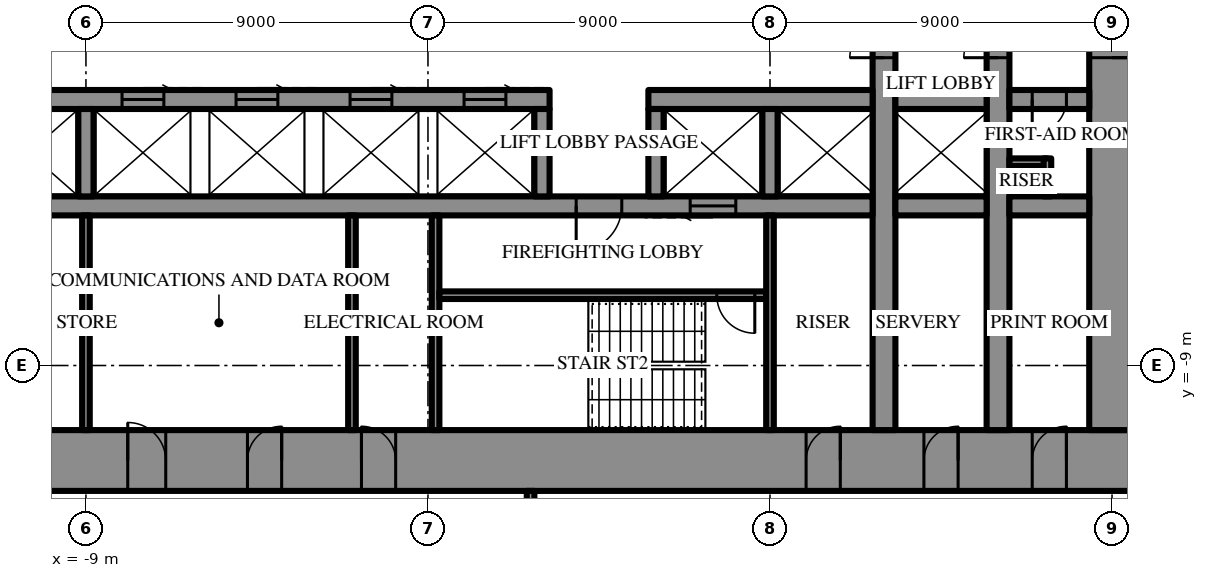
"""IFC4 building model, lengths in metres.
Left out: names, types, materials, properties, quantities, classifications, styles, units other than length and angle.
Written with IfcOpenShell. Run it as: python <this file> out.ifc"""

import sys

from ifc_helpers import new_model, si_unit, direction, frame, frame_2d, origin, place, context, subcontext, project, spatial, rectangle, extrude, element, fill, save


model = new_model("IFC4")
c1 = context("Model", 3, precision=1e-05, world=origin(), true_north=direction((0.0, 1.0)))
c2 = subcontext(c1, "Body", "Model", "MODEL_VIEW")
j1 = project(units=[si_unit("LENGTHUNIT", "METRE"), si_unit("PLANEANGLEUNIT", "RADIAN")], contexts=[c1])
p1 = place(None, origin())
s1 = spatial("IfcSite", under=j1, at=p1, CompositionType="ELEMENT")
p2 = place(p1, origin())
s2 = spatial("IfcBuilding", under=s1, at=p2, CompositionType="ELEMENT")
p3 = place(p2, frame((0.0, 0.0, 148.9)))
s3 = spatial("IfcBuildingStorey", under=s2, at=p3, CompositionType="ELEMENT", Elevation=148.9)
p4 = place(p3, frame((18.6, -11.5, 0.0), z_axis=(0.0, 0.0, 1.0), x_axis=(-1.0, 0.0, 0.0)))
e1 = element("IfcWall", 1, at=p4, inside=s3, PredefinedType="SHEAR", context=c2, shape_type="SweptSolid", body=[
    extrude(rectangle(XDim=37.2, YDim=1.6, at=frame_2d((18.6, 0.0))), origin(), (0.0, 0.0, 1.0), 4.2),
])
p5 = place(p4, frame((19.45, 0.0, 0.0)))
e2 = element("IfcOpeningElement", 2, at=p5, cuts=e1, PredefinedType="OPENING", context=c2, shape_type="SweptSolid", body=[
    extrude(rectangle(XDim=0.9, YDim=2.2, at=frame_2d((0.45, 1.1))), frame((0.0, 0.81, 0.0), z_axis=(0.0, -1.0, 0.0), x_axis=(1.0, 0.0, 0.0)), (0.0, 0.0, 1.0), 1.62),
])
p6 = place(p4, frame((22.45, 0.0, 0.0)))
e3 = element("IfcOpeningElement", 3, at=p6, cuts=e1, PredefinedType="OPENING", context=c2, shape_type="SweptSolid", body=[
    extrude(rectangle(XDim=0.9, YDim=2.2, at=frame_2d((0.45, 1.1))), frame((0.0, 0.81, 0.0), z_axis=(0.0, -1.0, 0.0), x_axis=(1.0, 0.0, 0.0)), (0.0, 0.0, 1.0), 1.62),
])
p7 = place(p4, frame((25.5, 0.0, 0.0)))
e4 = element("IfcOpeningElement", 4, at=p7, cuts=e1, PredefinedType="OPENING", context=c2, shape_type="SweptSolid", body=[
    extrude(rectangle(XDim=1.0, YDim=2.2, at=frame_2d((0.5, 1.1))), frame((0.0, 0.81, 0.0), z_axis=(0.0, -1.0, 0.0), x_axis=(1.0, 0.0, 0.0)), (0.0, 0.0, 1.0), 1.62),
])
p8 = place(p4, frame((1.8, 0.0, 0.0)))
e5 = element("IfcOpeningElement", 5, at=p8, cuts=e1, PredefinedType="OPENING", context=c2, shape_type="SweptSolid", body=[
    extrude(rectangle(XDim=0.9, YDim=2.2, at=frame_2d((0.45, 1.1))), frame((0.0, 0.81, 0.0), z_axis=(0.0, -1.0, 0.0), x_axis=(1.0, 0.0, 0.0)), (0.0, 0.0, 1.0), 1.62),
])
p9 = place(p4, frame((4.65, 0.0, 0.0)))
e6 = element("IfcOpeningElement", 6, at=p9, cuts=e1, PredefinedType="OPENING", context=c2, shape_type="SweptSolid", body=[
    extrude(rectangle(XDim=0.9, YDim=2.2, at=frame_2d((0.45, 1.1))), frame((0.0, 0.81, 0.0), z_axis=(0.0, -1.0, 0.0), x_axis=(1.0, 0.0, 0.0)), (0.0, 0.0, 1.0), 1.62),
])
p10 = place(p4, frame((7.75, 0.0, 0.0)))
e7 = element("IfcOpeningElement", 7, at=p10, cuts=e1, PredefinedType="OPENING", context=c2, shape_type="SweptSolid", body=[
    extrude(rectangle(XDim=0.9, YDim=2.2, at=frame_2d((0.45, 1.1))), frame((0.0, 0.81, 0.0), z_axis=(0.0, -1.0, 0.0), x_axis=(1.0, 0.0, 0.0)), (0.0, 0.0, 1.0), 1.62),
])
p11 = place(p4, frame((28.55, 0.0, 0.0)))
e8 = element("IfcOpeningElement", 8, at=p11, cuts=e1, PredefinedType="OPENING", context=c2, shape_type="SweptSolid", body=[
    extrude(rectangle(XDim=0.9, YDim=2.2, at=frame_2d((0.45, 1.1))), frame((0.0, 0.81, 0.0), z_axis=(0.0, -1.0, 0.0), x_axis=(1.0, 0.0, 0.0)), (0.0, 0.0, 1.0), 1.62),
])
p12 = place(p4, frame((31.65, 0.0, 0.0)))
e9 = element("IfcOpeningElement", 9, at=p12, cuts=e1, PredefinedType="OPENING", context=c2, shape_type="SweptSolid", body=[
    extrude(rectangle(XDim=0.9, YDim=2.2, at=frame_2d((0.45, 1.1))), frame((0.0, 0.81, 0.0), z_axis=(0.0, -1.0, 0.0), x_axis=(1.0, 0.0, 0.0)), (0.0, 0.0, 1.0), 1.62),
])
p13 = place(p4, frame((34.5, 0.0, 0.0)))
e10 = element("IfcOpeningElement", 10, at=p13, cuts=e1, PredefinedType="OPENING", context=c2, shape_type="SweptSolid", body=[
    extrude(rectangle(XDim=0.9, YDim=2.2, at=frame_2d((0.45, 1.1))), frame((0.0, 0.81, 0.0), z_axis=(0.0, -1.0, 0.0), x_axis=(1.0, 0.0, 0.0)), (0.0, 0.0, 1.0), 1.62),
])
p14 = place(p3, frame((18.0, -10.7, 0.0), z_axis=(0.0, 0.0, 1.0), x_axis=(0.0, 1.0, 0.0)))
e11 = element("IfcWall", 11, at=p14, inside=s3, PredefinedType="SHEAR", context=c2, shape_type="SweptSolid", body=[
    extrude(rectangle(XDim=21.4, YDim=1.2, at=frame_2d((10.7, 0.0))), origin(), (0.0, 0.0, 1.0), 4.2),
])
p15 = place(p14, frame((9.8, 0.0, 0.0)))
e12 = element("IfcOpeningElement", 12, at=p15, cuts=e11, PredefinedType="OPENING", context=c2, shape_type="SweptSolid", body=[
    extrude(rectangle(XDim=1.8, YDim=2.4, at=frame_2d((0.9, 1.2))), frame((0.0, 0.61, 0.0), z_axis=(0.0, -1.0, 0.0), x_axis=(1.0, 0.0, 0.0)), (0.0, 0.0, 1.0), 1.22),
])
p16 = place(p3, frame((12.0, -10.7, 0.0), z_axis=(0.0, 0.0, 1.0), x_axis=(0.0, 1.0, 0.0)))
e13 = element("IfcWall", 13, at=p16, inside=s3, PredefinedType="SHEAR", context=c2, shape_type="SweptSolid", body=[
    extrude(rectangle(XDim=21.4, YDim=0.6, at=frame_2d((10.7, 0.0))), origin(), (0.0, 0.0, 1.0), 4.2),
])
p17 = place(p16, frame((9.8, 0.0, 0.0)))
e14 = element("IfcOpeningElement", 14, at=p17, cuts=e13, PredefinedType="OPENING", context=c2, shape_type="SweptSolid", body=[
    extrude(rectangle(XDim=1.8, YDim=2.4, at=frame_2d((0.9, 1.2))), frame((0.0, 0.31, 0.0), z_axis=(0.0, -1.0, 0.0), x_axis=(1.0, 0.0, 0.0)), (0.0, 0.0, 1.0), 0.62),
])
p18 = place(p3, frame((15.0, -10.7, 0.0), z_axis=(0.0, 0.0, 1.0), x_axis=(0.0, 1.0, 0.0)))
e15 = element("IfcWall", 15, at=p18, inside=s3, PredefinedType="SHEAR", context=c2, shape_type="SweptSolid", body=[
    extrude(rectangle(XDim=21.4, YDim=0.6, at=frame_2d((10.7, 0.0))), origin(), (0.0, 0.0, 1.0), 4.2),
])
p19 = place(p18, frame((9.8, 0.0, 0.0)))
e16 = element("IfcOpeningElement", 16, at=p19, cuts=e15, PredefinedType="OPENING", context=c2, shape_type="SweptSolid", body=[
    extrude(rectangle(XDim=1.8, YDim=2.4, at=frame_2d((0.9, 1.2))), frame((0.0, 0.31, 0.0), z_axis=(0.0, -1.0, 0.0), x_axis=(1.0, 0.0, 0.0)), (0.0, 0.0, 1.0), 0.62),
])
p20 = place(p3, frame((17.4, -2.0, 0.0), z_axis=(0.0, 0.0, 1.0), x_axis=(-1.0, 0.0, 0.0)))
e17 = element("IfcWall", 17, at=p20, inside=s3, PredefinedType="SHEAR", context=c2, shape_type="SweptSolid", body=[
    extrude(rectangle(XDim=2.1, YDim=0.5, at=frame_2d((1.05, 0.0))), origin(), (0.0, 0.0, 1.0), 4.2),
])
p21 = place(p20, frame((0.6, 0.0, 0.0)))
e18 = element("IfcOpeningElement", 18, at=p21, cuts=e17, PredefinedType="OPENING", context=c2, shape_type="SweptSolid", body=[
    extrude(rectangle(XDim=0.9, YDim=2.2, at=frame_2d((0.45, 1.1))), frame((0.0, 0.26, 0.0), z_axis=(0.0, -1.0, 0.0), x_axis=(1.0, 0.0, 0.0)), (0.0, 0.0, 1.0), 0.52),
])
p22 = place(p3, frame((14.7, -2.0, 0.0), z_axis=(0.0, 0.0, 1.0), x_axis=(-1.0, 0.0, 0.0)))
e19 = element("IfcWall", 19, at=p22, inside=s3, PredefinedType="SHEAR", context=c2, shape_type="SweptSolid", body=[
    extrude(rectangle(XDim=2.4, YDim=0.5, at=frame_2d((1.2, 0.0))), origin(), (0.0, 0.0, 1.0), 4.2),
])
p23 = place(p3, frame((11.7, -2.0, 0.0), z_axis=(0.0, 0.0, 1.0), x_axis=(-1.0, 0.0, 0.0)))
e20 = element("IfcWall", 20, at=p23, inside=s3, PredefinedType="SHEAR", context=c2, shape_type="SweptSolid", body=[
    extrude(rectangle(XDim=5.9, YDim=0.5, at=frame_2d((2.95, 0.0))), origin(), (0.0, 0.0, 1.0), 4.2),
])
p24 = place(p3, frame((3.2, -2.0, 0.0), z_axis=(0.0, 0.0, 1.0), x_axis=(-1.0, 0.0, 0.0)))
e21 = element("IfcWall", 21, at=p24, inside=s3, PredefinedType="SHEAR", context=c2, shape_type="SweptSolid", body=[
    extrude(rectangle(XDim=14.9, YDim=0.5, at=frame_2d((7.45, 0.0))), origin(), (0.0, 0.0, 1.0), 4.2),
])
p25 = place(p24, frame((1.15, 0.0, 0.0)))
e22 = element("IfcOpeningElement", 22, at=p25, cuts=e21, PredefinedType="OPENING", context=c2, shape_type="SweptSolid", body=[
    extrude(rectangle(XDim=1.1, YDim=2.2, at=frame_2d((0.55, 1.1))), frame((0.0, 0.26, 0.0), z_axis=(0.0, -1.0, 0.0), x_axis=(1.0, 0.0, 0.0)), (0.0, 0.0, 1.0), 0.52),
])
p26 = place(p24, frame((4.15, 0.0, 0.0)))
e23 = element("IfcOpeningElement", 23, at=p26, cuts=e21, PredefinedType="OPENING", context=c2, shape_type="SweptSolid", body=[
    extrude(rectangle(XDim=1.1, YDim=2.2, at=frame_2d((0.55, 1.1))), frame((0.0, 0.26, 0.0), z_axis=(0.0, -1.0, 0.0), x_axis=(1.0, 0.0, 0.0)), (0.0, 0.0, 1.0), 0.52),
])
p27 = place(p24, frame((7.15, 0.0, 0.0)))
e24 = element("IfcOpeningElement", 24, at=p27, cuts=e21, PredefinedType="OPENING", context=c2, shape_type="SweptSolid", body=[
    extrude(rectangle(XDim=1.1, YDim=2.2, at=frame_2d((0.55, 1.1))), frame((0.0, 0.26, 0.0), z_axis=(0.0, -1.0, 0.0), x_axis=(1.0, 0.0, 0.0)), (0.0, 0.0, 1.0), 0.52),
])
p28 = place(p24, frame((10.15, 0.0, 0.0)))
e25 = element("IfcOpeningElement", 25, at=p28, cuts=e21, PredefinedType="OPENING", context=c2, shape_type="SweptSolid", body=[
    extrude(rectangle(XDim=1.1, YDim=2.2, at=frame_2d((0.55, 1.1))), frame((0.0, 0.26, 0.0), z_axis=(0.0, -1.0, 0.0), x_axis=(1.0, 0.0, 0.0)), (0.0, 0.0, 1.0), 0.52),
])
p29 = place(p3, frame((17.4, -4.8, 0.0), z_axis=(0.0, 0.0, 1.0), x_axis=(-1.0, 0.0, 0.0)))
e26 = element("IfcWall", 26, at=p29, inside=s3, PredefinedType="SHEAR", context=c2, shape_type="SweptSolid", body=[
    extrude(rectangle(XDim=2.1, YDim=0.5, at=frame_2d((1.05, 0.0))), origin(), (0.0, 0.0, 1.0), 4.2),
])
p30 = place(p3, frame((14.7, -4.8, 0.0), z_axis=(0.0, 0.0, 1.0), x_axis=(-1.0, 0.0, 0.0)))
e27 = element("IfcWall", 27, at=p30, inside=s3, PredefinedType="SHEAR", context=c2, shape_type="SweptSolid", body=[
    extrude(rectangle(XDim=2.4, YDim=0.5, at=frame_2d((1.2, 0.0))), origin(), (0.0, 0.0, 1.0), 4.2),
])
p31 = place(p3, frame((11.7, -4.8, 0.0), z_axis=(0.0, 0.0, 1.0), x_axis=(-1.0, 0.0, 0.0)))
e28 = element("IfcWall", 28, at=p31, inside=s3, PredefinedType="SHEAR", context=c2, shape_type="SweptSolid", body=[
    extrude(rectangle(XDim=23.4, YDim=0.5, at=frame_2d((11.7, 0.0))), origin(), (0.0, 0.0, 1.0), 4.2),
])
p32 = place(p31, frame((6.6, 0.0, 0.0)))
e29 = element("IfcOpeningElement", 29, at=p32, cuts=e28, PredefinedType="OPENING", context=c2, shape_type="SweptSolid", body=[
    extrude(rectangle(XDim=1.2, YDim=2.2, at=frame_2d((0.6, 1.1))), frame((0.0, 0.26, 0.0), z_axis=(0.0, -1.0, 0.0), x_axis=(1.0, 0.0, 0.0)), (0.0, 0.0, 1.0), 0.52),
])
p33 = place(p31, frame((3.6, 0.0, 0.0)))
e30 = element("IfcOpeningElement", 30, at=p33, cuts=e28, PredefinedType="OPENING", context=c2, shape_type="SweptSolid", body=[
    extrude(rectangle(XDim=1.2, YDim=2.2, at=frame_2d((0.6, 1.1))), frame((0.0, 0.26, 0.0), z_axis=(0.0, -1.0, 0.0), x_axis=(1.0, 0.0, 0.0)), (0.0, 0.0, 1.0), 0.52),
])
for number, where, z_axis, x_axis in (
    (31, (9.0, -2.25, 0.0), (0.0, 0.0, 1.0), (0.0, -1.0, 0.0)),
    (32, (6.0, -2.25, 0.0), (0.0, 0.0, 1.0), (0.0, -1.0, 0.0)),
    (33, (3.0, -2.25, 0.0), (0.0, 0.0, 1.0), (0.0, -1.0, 0.0)),
    (34, (-9.0, -2.25, 0.0), (0.0, 0.0, 1.0), (0.0, -1.0, 0.0)),
):
    element("IfcWall", number, at=place(p3, frame(where, z_axis=z_axis, x_axis=x_axis)), inside=s3, PredefinedType="SHEAR", context=c2, shape_type="SweptSolid", body=[
        extrude(rectangle(XDim=2.3, YDim=0.4, at=frame_2d((1.15, 0.0))), origin(), (0.0, 0.0, 1.0), 4.2),
    ])
p34 = place(p3, frame((0.2, -5.05, 0.0), z_axis=(0.0, 0.0, 1.0), x_axis=(0.0, -1.0, 0.0)))
e35 = element("IfcWall", 35, at=p34, inside=s3, PredefinedType="SHEAR", context=c2, shape_type="SweptSolid", body=[
    extrude(rectangle(XDim=5.65, YDim=0.2, at=frame_2d((2.825, 0.0))), origin(), (0.0, 0.0, 1.0), 4.2),
])
p35 = place(p3, frame((8.9, -7.15, 0.0), z_axis=(0.0, 0.0, 1.0), x_axis=(-1.0, 0.0, 0.0)))
e36 = element("IfcWall", 36, at=p35, inside=s3, PredefinedType="SHEAR", context=c2, shape_type="SweptSolid", body=[
    extrude(rectangle(XDim=8.6, YDim=0.2, at=frame_2d((4.3, 0.0))), origin(), (0.0, 0.0, 1.0), 4.2),
])
p36 = place(p35, frame((0.3, 0.0, 0.0)))
e37 = element("IfcOpeningElement", 37, at=p36, cuts=e36, PredefinedType="OPENING", context=c2, shape_type="SweptSolid", body=[
    extrude(rectangle(XDim=1.0, YDim=2.2, at=frame_2d((0.5, 1.1))), frame((0.0, 0.11, 0.0), z_axis=(0.0, -1.0, 0.0), x_axis=(1.0, 0.0, 0.0)), (0.0, 0.0, 1.0), 0.22),
])
for number, where, z_axis, x_axis in (
    (38, (9.0, -5.05, 0.0), (0.0, 0.0, 1.0), (0.0, -1.0, 0.0)),
    (39, (-9.0, -5.05, 0.0), (0.0, 0.0, 1.0), (0.0, -1.0, 0.0)),
    (40, (-2.0, -5.05, 0.0), (0.0, 0.0, 1.0), (0.0, -1.0, 0.0)),
):
    element("IfcWall", number, at=place(p3, frame(where, z_axis=z_axis, x_axis=x_axis)), inside=s3, PredefinedType="PARTITIONING", context=c2, shape_type="SweptSolid", body=[
        extrude(rectangle(XDim=5.65, YDim=0.2, at=frame_2d((2.825, 0.0))), origin(), (0.0, 0.0, 1.0), 4.0),
    ])
for number, where, z_axis, x_axis in (
    (41, (16.3, -3.65, 0.0), (0.0, 0.0, 1.0), (-1.0, 0.0, 0.0)),
    (42, (16.3, -3.55, 0.0), (0.0, 0.0, 1.0), (0.0, -1.0, 0.0)),
):
    element("IfcWall", number, at=place(p3, frame(where, z_axis=z_axis, x_axis=x_axis)), inside=s3, PredefinedType="PARTITIONING", context=c2, shape_type="SweptSolid", body=[
        extrude(rectangle(XDim=1.0, YDim=0.2, at=frame_2d((0.5, 0.0))), origin(), (0.0, 0.0, 1.0), 4.0),
    ])
p37 = place(p3, frame((2.7, -12.3, 0.0), z_axis=(0.0, 0.0, 1.0), x_axis=(0.0, -1.0, 0.0)))
e43 = element("IfcWall", 43, at=p37, inside=s3, PredefinedType="PARTITIONING", context=c2, shape_type="SweptSolid", body=[
    extrude(rectangle(XDim=1.7, YDim=0.2, at=frame_2d((0.85, 0.0))), origin(), (0.0, 0.0, 1.0), 4.0),
])
p38 = place(p37, frame((0.35, 0.0, 0.0)))
e44 = element("IfcOpeningElement", 44, at=p38, cuts=e43, PredefinedType="OPENING", context=c2, shape_type="SweptSolid", body=[
    extrude(rectangle(XDim=1.0, YDim=2.2, at=frame_2d((0.5, 1.1))), frame((0.0, 0.11, 0.0), z_axis=(0.0, -1.0, 0.0), x_axis=(1.0, 0.0, 0.0)), (0.0, 0.0, 1.0), 0.22),
])
p39 = place(p15, frame((1.8, 0.0, 0.0), z_axis=(0.0, 0.0, 1.0), x_axis=(-1.0, 0.0, 0.0)))
e45 = element("IfcDoor", 45, at=p39, inside=s3, OperationType="DOUBLE_DOOR_SINGLE_SWING", PredefinedType="DOOR", context=c2, shape_type="SweptSolid", body=[
    extrude(rectangle(XDim=1.8, YDim=2.4, at=frame_2d((0.9, 1.2))), frame((0.0, 0.025, 0.0), z_axis=(0.0, -1.0, 0.0), x_axis=(1.0, 0.0, 0.0)), (0.0, 0.0, 1.0), 0.05),
])
fill(e12, e45)
p40 = place(p32, origin())
e46 = element("IfcDoor", 46, at=p40, inside=s3, OperationType="SINGLE_SWING_LEFT", PredefinedType="DOOR", context=c2, shape_type="SweptSolid", body=[
    extrude(rectangle(XDim=1.2, YDim=2.2, at=frame_2d((0.6, 1.1))), frame((0.0, 0.025, 0.0), z_axis=(0.0, -1.0, 0.0), x_axis=(1.0, 0.0, 0.0)), (0.0, 0.0, 1.0), 0.05),
])
fill(e29, e46)
p41 = place(p36, origin())
e47 = element("IfcDoor", 47, at=p41, inside=s3, OperationType="SINGLE_SWING_RIGHT", PredefinedType="DOOR", context=c2, shape_type="SweptSolid", body=[
    extrude(rectangle(XDim=1.0, YDim=2.2, at=frame_2d((0.5, 1.1))), frame((0.0, 0.025, 0.0), z_axis=(0.0, -1.0, 0.0), x_axis=(1.0, 0.0, 0.0)), (0.0, 0.0, 1.0), 0.05),
])
fill(e37, e47)
p42 = place(p5, frame((0.9, 0.0, 0.0), z_axis=(0.0, 0.0, 1.0), x_axis=(-1.0, 0.0, 0.0)))
e48 = element("IfcDoor", 48, at=p42, inside=s3, OperationType="SINGLE_SWING_RIGHT", PredefinedType="DOOR", context=c2, shape_type="SweptSolid", body=[
    extrude(rectangle(XDim=0.9, YDim=2.2, at=frame_2d((0.45, 1.1))), frame((0.0, 0.025, 0.0), z_axis=(0.0, -1.0, 0.0), x_axis=(1.0, 0.0, 0.0)), (0.0, 0.0, 1.0), 0.05),
])
fill(e2, e48)
p43 = place(p6, frame((0.9, 0.0, 0.0), z_axis=(0.0, 0.0, 1.0), x_axis=(-1.0, 0.0, 0.0)))
e49 = element("IfcDoor", 49, at=p43, inside=s3, OperationType="SINGLE_SWING_LEFT", PredefinedType="DOOR", context=c2, shape_type="SweptSolid", body=[
    extrude(rectangle(XDim=0.9, YDim=2.2, at=frame_2d((0.45, 1.1))), frame((0.0, 0.025, 0.0), z_axis=(0.0, -1.0, 0.0), x_axis=(1.0, 0.0, 0.0)), (0.0, 0.0, 1.0), 0.05),
])
fill(e3, e49)
p44 = place(p7, frame((1.0, 0.0, 0.0), z_axis=(0.0, 0.0, 1.0), x_axis=(-1.0, 0.0, 0.0)))
e50 = element("IfcDoor", 50, at=p44, inside=s3, OperationType="SINGLE_SWING_RIGHT", PredefinedType="DOOR", context=c2, shape_type="SweptSolid", body=[
    extrude(rectangle(XDim=1.0, YDim=2.2, at=frame_2d((0.5, 1.1))), frame((0.0, 0.025, 0.0), z_axis=(0.0, -1.0, 0.0), x_axis=(1.0, 0.0, 0.0)), (0.0, 0.0, 1.0), 0.05),
])
fill(e4, e50)
p45 = place(p8, frame((0.9, 0.0, 0.0), z_axis=(0.0, 0.0, 1.0), x_axis=(-1.0, 0.0, 0.0)))
e51 = element("IfcDoor", 51, at=p45, inside=s3, OperationType="SINGLE_SWING_LEFT", PredefinedType="DOOR", context=c2, shape_type="SweptSolid", body=[
    extrude(rectangle(XDim=0.9, YDim=2.2, at=frame_2d((0.45, 1.1))), frame((0.0, 0.025, 0.0), z_axis=(0.0, -1.0, 0.0), x_axis=(1.0, 0.0, 0.0)), (0.0, 0.0, 1.0), 0.05),
])
fill(e5, e51)
p46 = place(p9, frame((0.9, 0.0, 0.0), z_axis=(0.0, 0.0, 1.0), x_axis=(-1.0, 0.0, 0.0)))
e52 = element("IfcDoor", 52, at=p46, inside=s3, OperationType="SINGLE_SWING_LEFT", PredefinedType="DOOR", context=c2, shape_type="SweptSolid", body=[
    extrude(rectangle(XDim=0.9, YDim=2.2, at=frame_2d((0.45, 1.1))), frame((0.0, 0.025, 0.0), z_axis=(0.0, -1.0, 0.0), x_axis=(1.0, 0.0, 0.0)), (0.0, 0.0, 1.0), 0.05),
])
fill(e6, e52)
p47 = place(p10, frame((0.9, 0.0, 0.0), z_axis=(0.0, 0.0, 1.0), x_axis=(-1.0, 0.0, 0.0)))
e53 = element("IfcDoor", 53, at=p47, inside=s3, OperationType="SINGLE_SWING_LEFT", PredefinedType="DOOR", context=c2, shape_type="SweptSolid", body=[
    extrude(rectangle(XDim=0.9, YDim=2.2, at=frame_2d((0.45, 1.1))), frame((0.0, 0.025, 0.0), z_axis=(0.0, -1.0, 0.0), x_axis=(1.0, 0.0, 0.0)), (0.0, 0.0, 1.0), 0.05),
])
fill(e7, e53)
p48 = place(p21, origin())
e54 = element("IfcDoor", 54, at=p48, inside=s3, OperationType="SINGLE_SWING_LEFT", PredefinedType="DOOR", context=c2, shape_type="SweptSolid", body=[
    extrude(rectangle(XDim=0.9, YDim=2.2, at=frame_2d((0.45, 1.1))), frame((0.0, 0.025, 0.0), z_axis=(0.0, -1.0, 0.0), x_axis=(1.0, 0.0, 0.0)), (0.0, 0.0, 1.0), 0.05),
])
fill(e18, e54)
p49 = place(p17, origin())
e55 = element("IfcDoor", 55, at=p49, inside=s3, OperationType="DOUBLE_DOOR_SINGLE_SWING", PredefinedType="DOOR", context=c2, shape_type="SweptSolid", body=[
    extrude(rectangle(XDim=1.8, YDim=2.4, at=frame_2d((0.9, 1.2))), frame((0.0, 0.025, 0.0), z_axis=(0.0, -1.0, 0.0), x_axis=(1.0, 0.0, 0.0)), (0.0, 0.0, 1.0), 0.05),
])
fill(e14, e55)
p50 = place(p19, origin())
e56 = element("IfcDoor", 56, at=p50, inside=s3, OperationType="DOUBLE_DOOR_SINGLE_SWING", PredefinedType="DOOR", context=c2, shape_type="SweptSolid", body=[
    extrude(rectangle(XDim=1.8, YDim=2.4, at=frame_2d((0.9, 1.2))), frame((0.0, 0.025, 0.0), z_axis=(0.0, -1.0, 0.0), x_axis=(1.0, 0.0, 0.0)), (0.0, 0.0, 1.0), 0.05),
])
fill(e16, e56)
p51 = place(p33, origin())
e57 = element("IfcDoor", 57, at=p51, inside=s3, OperationType="SLIDING_TO_LEFT", PredefinedType="DOOR", context=c2, shape_type="SweptSolid", body=[
    extrude(rectangle(XDim=1.2, YDim=2.2, at=frame_2d((0.6, 1.1))), frame((0.0, 0.025, 0.0), z_axis=(0.0, -1.0, 0.0), x_axis=(1.0, 0.0, 0.0)), (0.0, 0.0, 1.0), 0.05),
])
fill(e30, e57)
p52 = place(p25, frame((1.1, 0.0, 0.0), z_axis=(0.0, 0.0, 1.0), x_axis=(-1.0, 0.0, 0.0)))
e58 = element("IfcDoor", 58, at=p52, inside=s3, OperationType="SLIDING_TO_LEFT", PredefinedType="DOOR", context=c2, shape_type="SweptSolid", body=[
    extrude(rectangle(XDim=1.1, YDim=2.2, at=frame_2d((0.55, 1.1))), frame((0.0, 0.025, 0.0), z_axis=(0.0, -1.0, 0.0), x_axis=(1.0, 0.0, 0.0)), (0.0, 0.0, 1.0), 0.05),
])
fill(e22, e58)
p53 = place(p26, frame((1.1, 0.0, 0.0), z_axis=(0.0, 0.0, 1.0), x_axis=(-1.0, 0.0, 0.0)))
e59 = element("IfcDoor", 59, at=p53, inside=s3, OperationType="SLIDING_TO_LEFT", PredefinedType="DOOR", context=c2, shape_type="SweptSolid", body=[
    extrude(rectangle(XDim=1.1, YDim=2.2, at=frame_2d((0.55, 1.1))), frame((0.0, 0.025, 0.0), z_axis=(0.0, -1.0, 0.0), x_axis=(1.0, 0.0, 0.0)), (0.0, 0.0, 1.0), 0.05),
])
fill(e23, e59)
p54 = place(p27, frame((1.1, 0.0, 0.0), z_axis=(0.0, 0.0, 1.0), x_axis=(-1.0, 0.0, 0.0)))
e60 = element("IfcDoor", 60, at=p54, inside=s3, OperationType="SLIDING_TO_LEFT", PredefinedType="DOOR", context=c2, shape_type="SweptSolid", body=[
    extrude(rectangle(XDim=1.1, YDim=2.2, at=frame_2d((0.55, 1.1))), frame((0.0, 0.025, 0.0), z_axis=(0.0, -1.0, 0.0), x_axis=(1.0, 0.0, 0.0)), (0.0, 0.0, 1.0), 0.05),
])
fill(e24, e60)
p55 = place(p28, frame((1.1, 0.0, 0.0), z_axis=(0.0, 0.0, 1.0), x_axis=(-1.0, 0.0, 0.0)))
e61 = element("IfcDoor", 61, at=p55, inside=s3, OperationType="SLIDING_TO_LEFT", PredefinedType="DOOR", context=c2, shape_type="SweptSolid", body=[
    extrude(rectangle(XDim=1.1, YDim=2.2, at=frame_2d((0.55, 1.1))), frame((0.0, 0.025, 0.0), z_axis=(0.0, -1.0, 0.0), x_axis=(1.0, 0.0, 0.0)), (0.0, 0.0, 1.0), 0.05),
])
fill(e25, e61)
save(model, sys.argv[1])
